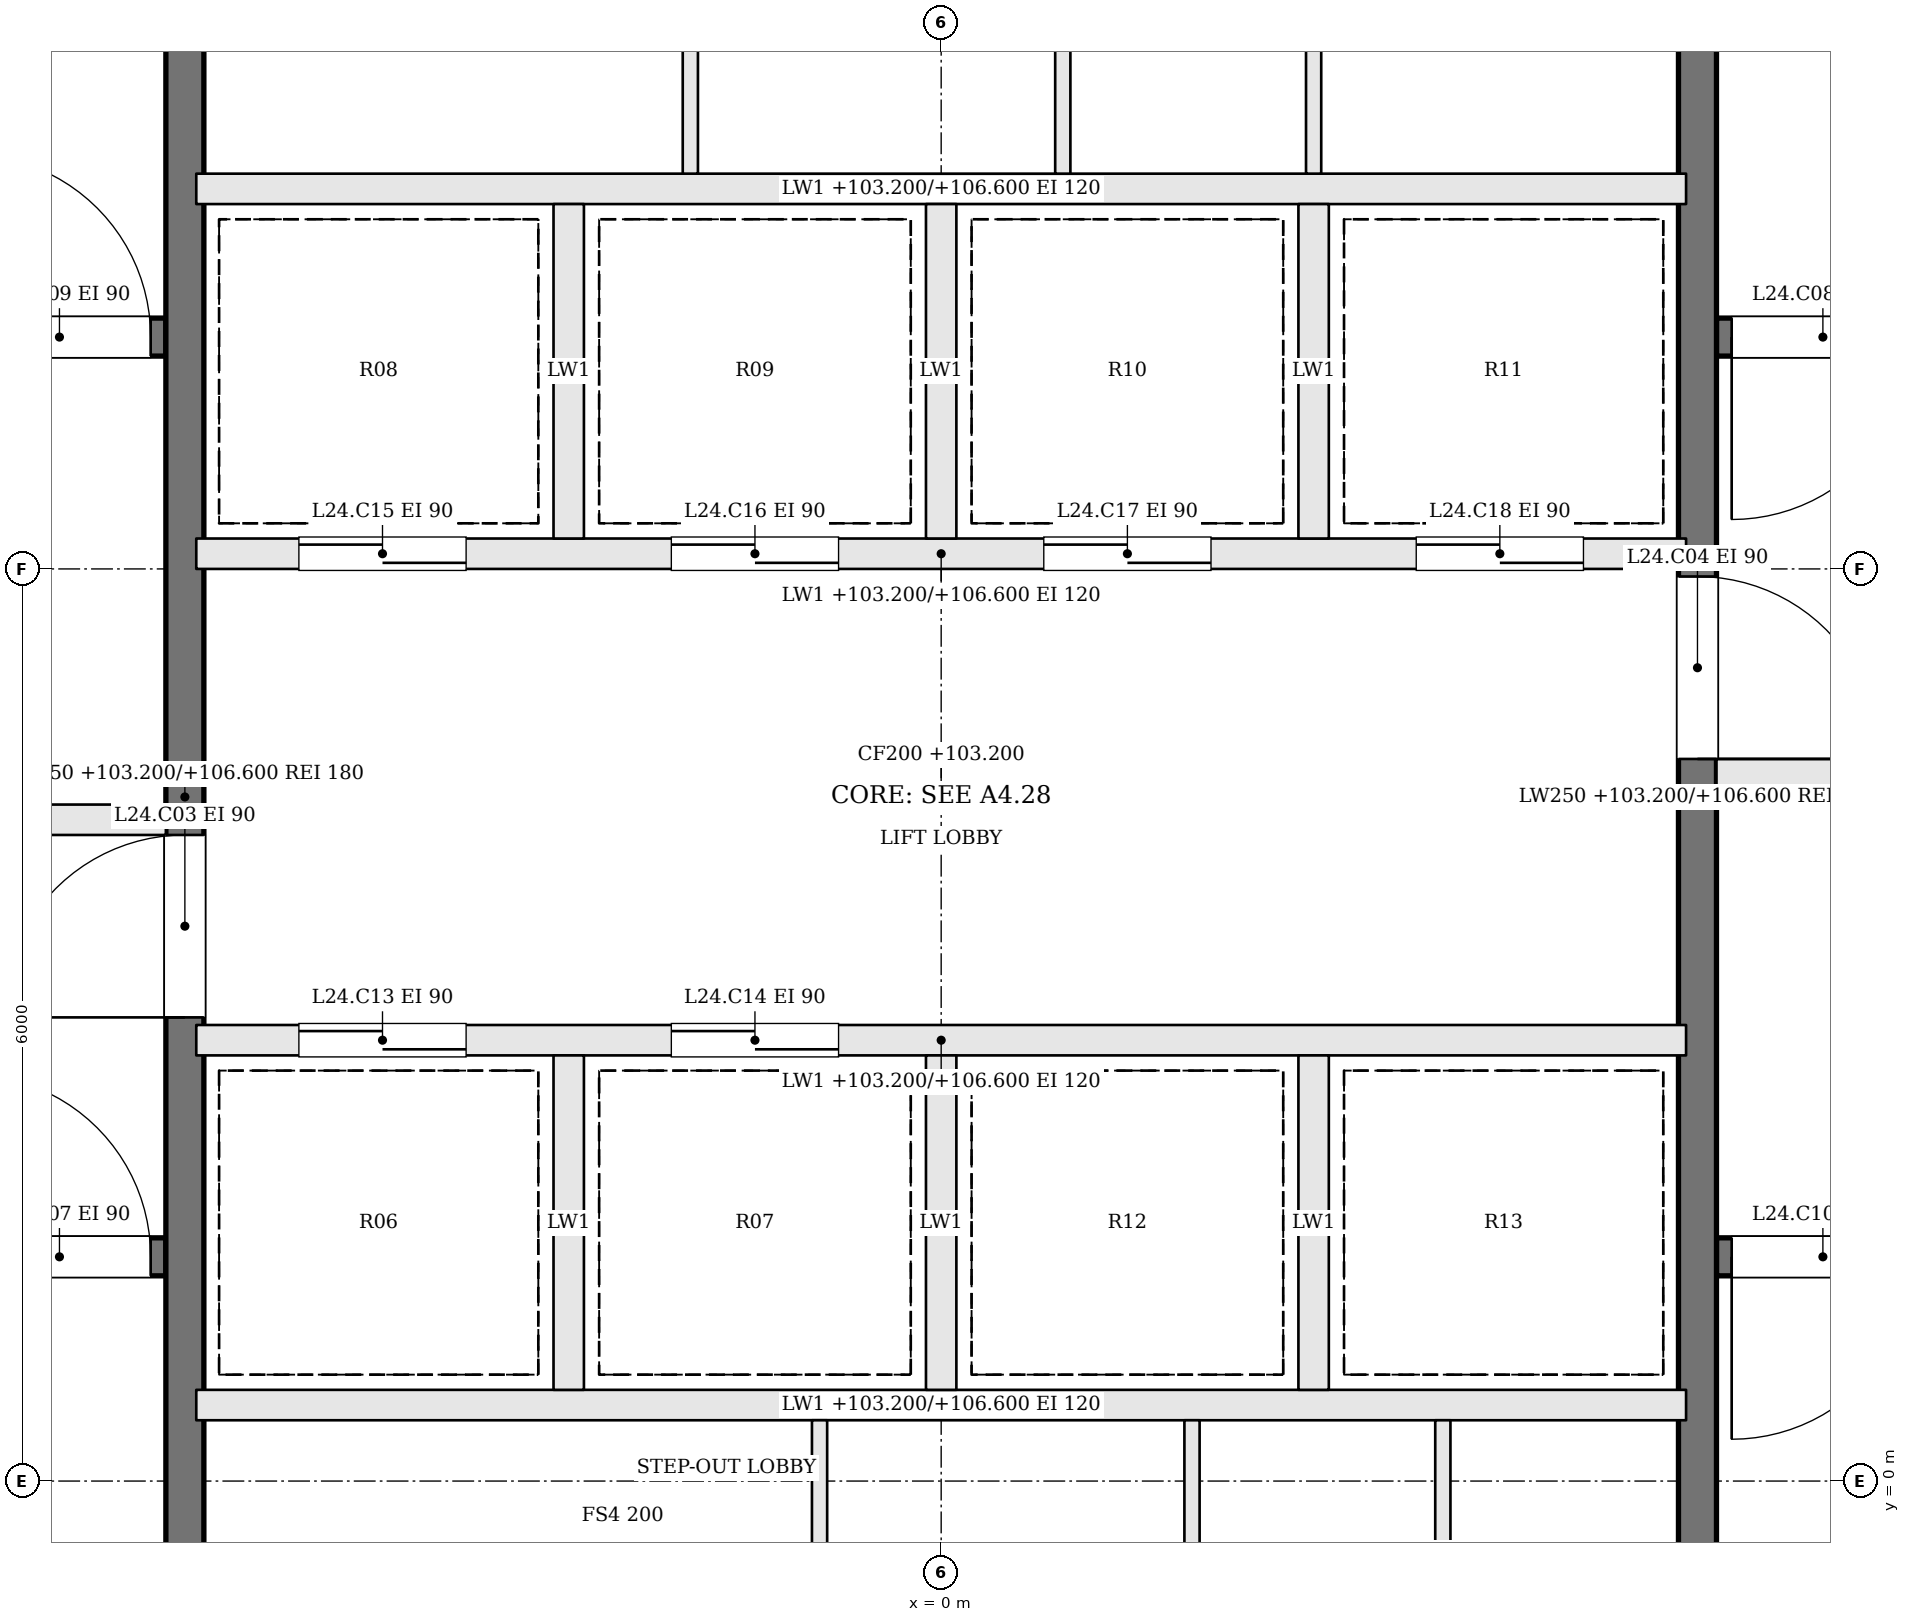
"""IFC4 building model, lengths in metres.
Left out: names, types, materials, properties, quantities, classifications, styles, units other than length and angle.
Written with IfcOpenShell. Run it as: python <this file> out.ifc"""

import sys

from ifc_helpers import new_model, si_unit, direction, frame, frame_2d, origin, place, context, subcontext, project, spatial, rectangle, extrude, element, fill, save


model = new_model("IFC4")
c1 = context("Model", 3, precision=1e-05, world=origin(), true_north=direction((0.0, 1.0)))
c2 = subcontext(c1, "Body", "Model", "MODEL_VIEW")
j1 = project(units=[si_unit("LENGTHUNIT", "METRE"), si_unit("PLANEANGLEUNIT", "RADIAN")], contexts=[c1])
p1 = place(None, origin())
s1 = spatial("IfcSite", under=j1, at=p1, CompositionType="ELEMENT")
p2 = place(p1, origin())
s2 = spatial("IfcBuilding", under=s1, at=p2, CompositionType="ELEMENT")
p3 = place(p2, frame((0.0, 0.0, 103.2)))
s3 = spatial("IfcBuildingStorey", under=s2, at=p3, CompositionType="ELEMENT", Elevation=103.2)
p4 = place(p3, frame((-11.9, 1.475, 0.0), z_axis=(0.0, 0.0, 1.0), x_axis=(1.0, 0.0, 0.0)))
e1 = element("IfcWall", 1, at=p4, inside=s3, PredefinedType="SOLIDWALL", context=c2, shape_type="SweptSolid", body=[
    extrude(rectangle(XDim=6.8, YDim=0.25, at=frame_2d((3.4, 0.0))), origin(), (0.0, 0.0, 1.0), 3.4),
])
p5 = place(p4, frame((5.5, 0.0, 0.0)))
e2 = element("IfcOpeningElement", 2, at=p5, cuts=e1, PredefinedType="OPENING", context=c2, shape_type="SweptSolid", body=[
    extrude(rectangle(XDim=1.2, YDim=2.1, at=frame_2d((0.6, 1.05))), frame((0.0, 0.135, 0.0), z_axis=(0.0, -1.0, 0.0), x_axis=(1.0, 0.0, 0.0)), (0.0, 0.0, 1.0), 0.27),
])
p6 = place(p3, frame((11.9, 7.525, 0.0), z_axis=(0.0, 0.0, 1.0), x_axis=(-1.0, 0.0, 0.0)))
e3 = element("IfcWall", 3, at=p6, inside=s3, PredefinedType="SOLIDWALL", context=c2, shape_type="SweptSolid", body=[
    extrude(rectangle(XDim=6.8, YDim=0.25, at=frame_2d((3.4, 0.0))), origin(), (0.0, 0.0, 1.0), 3.4),
])
p7 = place(p6, frame((5.5, 0.0, 0.0)))
e4 = element("IfcOpeningElement", 4, at=p7, cuts=e3, PredefinedType="OPENING", context=c2, shape_type="SweptSolid", body=[
    extrude(rectangle(XDim=1.2, YDim=2.1, at=frame_2d((0.6, 1.05))), frame((0.0, 0.135, 0.0), z_axis=(0.0, -1.0, 0.0), x_axis=(1.0, 0.0, 0.0)), (0.0, 0.0, 1.0), 0.27),
])
p8 = place(p3, frame((-11.9, 4.35, 0.0), z_axis=(0.0, 0.0, 1.0), x_axis=(1.0, 0.0, 0.0)))
e5 = element("IfcWall", 5, at=p8, inside=s3, PredefinedType="SOLIDWALL", context=c2, shape_type="SweptSolid", body=[
    extrude(rectangle(XDim=6.8, YDim=0.2, at=frame_2d((3.4, 0.0))), origin(), (0.0, 0.0, 1.0), 3.4),
])
p9 = place(p8, frame((4.1, 0.0, 0.0)))
e6 = element("IfcOpeningElement", 6, at=p9, cuts=e5, PredefinedType="OPENING", context=c2, shape_type="SweptSolid", body=[
    extrude(rectangle(XDim=1.2, YDim=2.1, at=frame_2d((0.6, 1.05))), frame((0.0, 0.11, 0.0), z_axis=(0.0, -1.0, 0.0), x_axis=(1.0, 0.0, 0.0)), (0.0, 0.0, 1.0), 0.22),
])
p10 = place(p8, frame((0.8, 0.0, 0.0)))
e7 = element("IfcOpeningElement", 7, at=p10, cuts=e5, PredefinedType="OPENING", context=c2, shape_type="SweptSolid", body=[
    extrude(rectangle(XDim=1.2, YDim=2.1, at=frame_2d((0.6, 1.05))), frame((0.0, 0.11, 0.0), z_axis=(0.0, -1.0, 0.0), x_axis=(1.0, 0.0, 0.0)), (0.0, 0.0, 1.0), 0.22),
])
p11 = place(p3, frame((11.9, 4.65, 0.0), z_axis=(0.0, 0.0, 1.0), x_axis=(-1.0, 0.0, 0.0)))
e8 = element("IfcWall", 8, at=p11, inside=s3, PredefinedType="SOLIDWALL", context=c2, shape_type="SweptSolid", body=[
    extrude(rectangle(XDim=6.8, YDim=0.2, at=frame_2d((3.4, 0.0))), origin(), (0.0, 0.0, 1.0), 3.4),
])
p12 = place(p11, frame((4.1, 0.0, 0.0)))
e9 = element("IfcOpeningElement", 9, at=p12, cuts=e8, PredefinedType="OPENING", context=c2, shape_type="SweptSolid", body=[
    extrude(rectangle(XDim=1.2, YDim=2.1, at=frame_2d((0.6, 1.05))), frame((0.0, 0.11, 0.0), z_axis=(0.0, -1.0, 0.0), x_axis=(1.0, 0.0, 0.0)), (0.0, 0.0, 1.0), 0.22),
])
p13 = place(p11, frame((0.8, 0.0, 0.0)))
e10 = element("IfcOpeningElement", 10, at=p13, cuts=e8, PredefinedType="OPENING", context=c2, shape_type="SweptSolid", body=[
    extrude(rectangle(XDim=1.2, YDim=2.1, at=frame_2d((0.6, 1.05))), frame((0.0, 0.11, 0.0), z_axis=(0.0, -1.0, 0.0), x_axis=(1.0, 0.0, 0.0)), (0.0, 0.0, 1.0), 0.22),
])
p14 = place(p3, frame((-11.9, 7.525, 0.0), z_axis=(0.0, 0.0, 1.0), x_axis=(1.0, 0.0, 0.0)))
e11 = element("IfcWall", 11, at=p14, inside=s3, PredefinedType="SOLIDWALL", context=c2, shape_type="SweptSolid", body=[
    extrude(rectangle(XDim=6.8, YDim=0.25, at=frame_2d((3.4, 0.0))), origin(), (0.0, 0.0, 1.0), 3.4),
])
p15 = place(p14, frame((5.5, 0.0, 0.0)))
e12 = element("IfcOpeningElement", 12, at=p15, cuts=e11, PredefinedType="OPENING", context=c2, shape_type="SweptSolid", body=[
    extrude(rectangle(XDim=1.2, YDim=2.1, at=frame_2d((0.6, 1.05))), frame((0.0, 0.135, 0.0), z_axis=(0.0, -1.0, 0.0), x_axis=(1.0, 0.0, 0.0)), (0.0, 0.0, 1.0), 0.27),
])
p16 = place(p3, frame((11.9, 1.475, 0.0), z_axis=(0.0, 0.0, 1.0), x_axis=(-1.0, 0.0, 0.0)))
e13 = element("IfcWall", 13, at=p16, inside=s3, PredefinedType="SOLIDWALL", context=c2, shape_type="SweptSolid", body=[
    extrude(rectangle(XDim=6.8, YDim=0.25, at=frame_2d((3.4, 0.0))), origin(), (0.0, 0.0, 1.0), 3.4),
])
p17 = place(p16, frame((5.5, 0.0, 0.0)))
e14 = element("IfcOpeningElement", 14, at=p17, cuts=e13, PredefinedType="OPENING", context=c2, shape_type="SweptSolid", body=[
    extrude(rectangle(XDim=1.2, YDim=2.1, at=frame_2d((0.6, 1.05))), frame((0.0, 0.135, 0.0), z_axis=(0.0, -1.0, 0.0), x_axis=(1.0, 0.0, 0.0)), (0.0, 0.0, 1.0), 0.27),
])
p18 = place(p3, frame((-4.975, -1.9, 0.0), z_axis=(0.0, 0.0, 1.0), x_axis=(0.0, 1.0, 0.0)))
e15 = element("IfcWall", 15, at=p18, inside=s3, PredefinedType="SOLIDWALL", context=c2, shape_type="SweptSolid", body=[
    extrude(rectangle(XDim=12.8, YDim=0.25, at=frame_2d((6.4, 0.0))), origin(), (0.0, 0.0, 1.0), 3.4),
])
p19 = place(p18, frame((4.95, 0.0, 0.0)))
e16 = element("IfcOpeningElement", 16, at=p19, cuts=e15, PredefinedType="OPENING", context=c2, shape_type="SweptSolid", body=[
    extrude(rectangle(XDim=1.2, YDim=2.1, at=frame_2d((0.6, 1.05))), frame((0.0, 0.135, 0.0), z_axis=(0.0, -1.0, 0.0), x_axis=(1.0, 0.0, 0.0)), (0.0, 0.0, 1.0), 0.27),
])
p20 = place(p3, frame((4.975, 10.9, 0.0), z_axis=(0.0, 0.0, 1.0), x_axis=(0.0, -1.0, 0.0)))
e17 = element("IfcWall", 17, at=p20, inside=s3, PredefinedType="SOLIDWALL", context=c2, shape_type="SweptSolid", body=[
    extrude(rectangle(XDim=12.8, YDim=0.25, at=frame_2d((6.4, 0.0))), origin(), (0.0, 0.0, 1.0), 3.4),
])
p21 = place(p20, frame((4.95, 0.0, 0.0)))
e18 = element("IfcOpeningElement", 18, at=p21, cuts=e17, PredefinedType="OPENING", context=c2, shape_type="SweptSolid", body=[
    extrude(rectangle(XDim=1.2, YDim=2.1, at=frame_2d((0.6, 1.05))), frame((0.0, 0.135, 0.0), z_axis=(0.0, -1.0, 0.0), x_axis=(1.0, 0.0, 0.0)), (0.0, 0.0, 1.0), 0.27),
])
p22 = place(p3, frame((-4.9, 0.5, 0.0), z_axis=(0.0, 0.0, 1.0), x_axis=(1.0, 0.0, 0.0)))
e19 = element("IfcWall", 19, at=p22, inside=s3, PredefinedType="SOLIDWALL", context=c2, shape_type="SweptSolid", body=[
    extrude(rectangle(XDim=9.8, YDim=0.2, at=frame_2d((4.9, 0.0))), origin(), (0.0, 0.0, 1.0), 3.4),
])
p23 = place(p3, frame((-4.9, 2.9, 0.0), z_axis=(0.0, 0.0, 1.0), x_axis=(1.0, 0.0, 0.0)))
e20 = element("IfcWall", 20, at=p23, inside=s3, PredefinedType="SOLIDWALL", context=c2, shape_type="SweptSolid", body=[
    extrude(rectangle(XDim=9.8, YDim=0.2, at=frame_2d((4.9, 0.0))), origin(), (0.0, 0.0, 1.0), 3.4),
])
p24 = place(p23, frame((0.675, 0.0, 0.0)))
e21 = element("IfcOpeningElement", 21, at=p24, cuts=e20, PredefinedType="OPENING", context=c2, shape_type="SweptSolid", body=[
    extrude(rectangle(XDim=1.1, YDim=2.1, at=frame_2d((0.55, 1.05))), frame((0.0, 0.11, 0.0), z_axis=(0.0, -1.0, 0.0), x_axis=(1.0, 0.0, 0.0)), (0.0, 0.0, 1.0), 0.22),
])
p25 = place(p23, frame((3.125, 0.0, 0.0)))
e22 = element("IfcOpeningElement", 22, at=p25, cuts=e20, PredefinedType="OPENING", context=c2, shape_type="SweptSolid", body=[
    extrude(rectangle(XDim=1.1, YDim=2.1, at=frame_2d((0.55, 1.05))), frame((0.0, 0.11, 0.0), z_axis=(0.0, -1.0, 0.0), x_axis=(1.0, 0.0, 0.0)), (0.0, 0.0, 1.0), 0.22),
])
p26 = place(p3, frame((-4.9, 6.1, 0.0), z_axis=(0.0, 0.0, 1.0), x_axis=(1.0, 0.0, 0.0)))
e23 = element("IfcWall", 23, at=p26, inside=s3, PredefinedType="SOLIDWALL", context=c2, shape_type="SweptSolid", body=[
    extrude(rectangle(XDim=9.8, YDim=0.2, at=frame_2d((4.9, 0.0))), origin(), (0.0, 0.0, 1.0), 3.4),
])
p27 = place(p26, frame((0.675, 0.0, 0.0)))
e24 = element("IfcOpeningElement", 24, at=p27, cuts=e23, PredefinedType="OPENING", context=c2, shape_type="SweptSolid", body=[
    extrude(rectangle(XDim=1.1, YDim=2.1, at=frame_2d((0.55, 1.05))), frame((0.0, 0.11, 0.0), z_axis=(0.0, -1.0, 0.0), x_axis=(1.0, 0.0, 0.0)), (0.0, 0.0, 1.0), 0.22),
])
p28 = place(p26, frame((3.125, 0.0, 0.0)))
e25 = element("IfcOpeningElement", 25, at=p28, cuts=e23, PredefinedType="OPENING", context=c2, shape_type="SweptSolid", body=[
    extrude(rectangle(XDim=1.1, YDim=2.1, at=frame_2d((0.55, 1.05))), frame((0.0, 0.11, 0.0), z_axis=(0.0, -1.0, 0.0), x_axis=(1.0, 0.0, 0.0)), (0.0, 0.0, 1.0), 0.22),
])
p29 = place(p26, frame((5.575, 0.0, 0.0)))
e26 = element("IfcOpeningElement", 26, at=p29, cuts=e23, PredefinedType="OPENING", context=c2, shape_type="SweptSolid", body=[
    extrude(rectangle(XDim=1.1, YDim=2.1, at=frame_2d((0.55, 1.05))), frame((0.0, 0.11, 0.0), z_axis=(0.0, -1.0, 0.0), x_axis=(1.0, 0.0, 0.0)), (0.0, 0.0, 1.0), 0.22),
])
p30 = place(p26, frame((8.025, 0.0, 0.0)))
e27 = element("IfcOpeningElement", 27, at=p30, cuts=e23, PredefinedType="OPENING", context=c2, shape_type="SweptSolid", body=[
    extrude(rectangle(XDim=1.1, YDim=2.1, at=frame_2d((0.55, 1.05))), frame((0.0, 0.11, 0.0), z_axis=(0.0, -1.0, 0.0), x_axis=(1.0, 0.0, 0.0)), (0.0, 0.0, 1.0), 0.22),
])
p31 = place(p3, frame((-4.9, 8.5, 0.0), z_axis=(0.0, 0.0, 1.0), x_axis=(1.0, 0.0, 0.0)))
e28 = element("IfcWall", 28, at=p31, inside=s3, PredefinedType="SOLIDWALL", context=c2, shape_type="SweptSolid", body=[
    extrude(rectangle(XDim=9.8, YDim=0.2, at=frame_2d((4.9, 0.0))), origin(), (0.0, 0.0, 1.0), 3.4),
])
for number, where, z_axis, x_axis in (
    (29, (-2.45, 0.6, 0.0), (0.0, 0.0, 1.0), (0.0, 1.0, 0.0)),
    (30, (0.0, 0.6, 0.0), (0.0, 0.0, 1.0), (0.0, 1.0, 0.0)),
    (31, (2.45, 0.6, 0.0), (0.0, 0.0, 1.0), (0.0, 1.0, 0.0)),
    (32, (-2.45, 6.2, 0.0), (0.0, 0.0, 1.0), (0.0, 1.0, 0.0)),
    (33, (0.0, 6.2, 0.0), (0.0, 0.0, 1.0), (0.0, 1.0, 0.0)),
    (34, (2.45, 6.2, 0.0), (0.0, 0.0, 1.0), (0.0, 1.0, 0.0)),
):
    element("IfcWall", number, at=place(p3, frame(where, z_axis=z_axis, x_axis=x_axis)), inside=s3, PredefinedType="SOLIDWALL", context=c2, shape_type="SweptSolid", body=[
        extrude(rectangle(XDim=2.2, YDim=0.2, at=frame_2d((1.1, 0.0))), origin(), (0.0, 0.0, 1.0), 3.4),
    ])
for number, where, z_axis, x_axis in (
    (35, (-0.8, -1.9, 0.0), (0.0, 0.0, 1.0), (0.0, 1.0, 0.0)),
    (36, (1.65, -1.9, 0.0), (0.0, 0.0, 1.0), (0.0, 1.0, 0.0)),
    (37, (3.3, -1.9, 0.0), (0.0, 0.0, 1.0), (0.0, 1.0, 0.0)),
    (38, (-1.65, 8.6, 0.0), (0.0, 0.0, 1.0), (0.0, 1.0, 0.0)),
    (39, (0.8, 8.6, 0.0), (0.0, 0.0, 1.0), (0.0, 1.0, 0.0)),
    (40, (2.45, 8.6, 0.0), (0.0, 0.0, 1.0), (0.0, 1.0, 0.0)),
):
    element("IfcWall", number, at=place(p3, frame(where, z_axis=z_axis, x_axis=x_axis)), inside=s3, PredefinedType="PARTITIONING", context=c2, shape_type="SweptSolid", body=[
        extrude(rectangle(XDim=2.3, YDim=0.1, at=frame_2d((1.15, 0.0))), origin(), (0.0, 0.0, 1.0), 3.4),
    ])
p32 = place(p19, origin())
e41 = element("IfcDoor", 41, at=p32, inside=s3, OperationType="SINGLE_SWING_LEFT", PredefinedType="DOOR", context=c2, shape_type="SweptSolid", body=[
    extrude(rectangle(XDim=1.2, YDim=2.1, at=frame_2d((0.6, 1.05))), frame((0.0, 0.025, 0.0), z_axis=(0.0, -1.0, 0.0), x_axis=(1.0, 0.0, 0.0)), (0.0, 0.0, 1.0), 0.05),
])
fill(e16, e41)
p33 = place(p21, origin())
e42 = element("IfcDoor", 42, at=p33, inside=s3, OperationType="SINGLE_SWING_RIGHT", PredefinedType="DOOR", context=c2, shape_type="SweptSolid", body=[
    extrude(rectangle(XDim=1.2, YDim=2.1, at=frame_2d((0.6, 1.05))), frame((0.0, 0.025, 0.0), z_axis=(0.0, -1.0, 0.0), x_axis=(1.0, 0.0, 0.0)), (0.0, 0.0, 1.0), 0.05),
])
fill(e18, e42)
p34 = place(p5, origin())
e43 = element("IfcDoor", 43, at=p34, inside=s3, OperationType="SINGLE_SWING_LEFT", PredefinedType="DOOR", context=c2, shape_type="SweptSolid", body=[
    extrude(rectangle(XDim=1.2, YDim=2.1, at=frame_2d((0.6, 1.05))), frame((0.0, 0.025, 0.0), z_axis=(0.0, -1.0, 0.0), x_axis=(1.0, 0.0, 0.0)), (0.0, 0.0, 1.0), 0.05),
])
fill(e2, e43)
p35 = place(p7, origin())
e44 = element("IfcDoor", 44, at=p35, inside=s3, OperationType="SINGLE_SWING_RIGHT", PredefinedType="DOOR", context=c2, shape_type="SweptSolid", body=[
    extrude(rectangle(XDim=1.2, YDim=2.1, at=frame_2d((0.6, 1.05))), frame((0.0, 0.025, 0.0), z_axis=(0.0, -1.0, 0.0), x_axis=(1.0, 0.0, 0.0)), (0.0, 0.0, 1.0), 0.05),
])
fill(e4, e44)
p36 = place(p15, origin())
e45 = element("IfcDoor", 45, at=p36, inside=s3, OperationType="SINGLE_SWING_LEFT", PredefinedType="DOOR", context=c2, shape_type="SweptSolid", body=[
    extrude(rectangle(XDim=1.2, YDim=2.1, at=frame_2d((0.6, 1.05))), frame((0.0, 0.025, 0.0), z_axis=(0.0, -1.0, 0.0), x_axis=(1.0, 0.0, 0.0)), (0.0, 0.0, 1.0), 0.05),
])
fill(e12, e45)
p37 = place(p17, origin())
e46 = element("IfcDoor", 46, at=p37, inside=s3, OperationType="SINGLE_SWING_RIGHT", PredefinedType="DOOR", context=c2, shape_type="SweptSolid", body=[
    extrude(rectangle(XDim=1.2, YDim=2.1, at=frame_2d((0.6, 1.05))), frame((0.0, 0.025, 0.0), z_axis=(0.0, -1.0, 0.0), x_axis=(1.0, 0.0, 0.0)), (0.0, 0.0, 1.0), 0.05),
])
fill(e14, e46)
p38 = place(p24, origin())
e47 = element("IfcDoor", 47, at=p38, inside=s3, OperationType="SLIDING_TO_RIGHT", PredefinedType="DOOR", context=c2, shape_type="SweptSolid", body=[
    extrude(rectangle(XDim=1.1, YDim=2.1, at=frame_2d((0.55, 1.05))), frame((0.0, 0.025, 0.0), z_axis=(0.0, -1.0, 0.0), x_axis=(1.0, 0.0, 0.0)), (0.0, 0.0, 1.0), 0.05),
])
fill(e21, e47)
p39 = place(p25, origin())
e48 = element("IfcDoor", 48, at=p39, inside=s3, OperationType="SLIDING_TO_LEFT", PredefinedType="DOOR", context=c2, shape_type="SweptSolid", body=[
    extrude(rectangle(XDim=1.1, YDim=2.1, at=frame_2d((0.55, 1.05))), frame((0.0, 0.025, 0.0), z_axis=(0.0, -1.0, 0.0), x_axis=(1.0, 0.0, 0.0)), (0.0, 0.0, 1.0), 0.05),
])
fill(e22, e48)
p40 = place(p27, origin())
e49 = element("IfcDoor", 49, at=p40, inside=s3, OperationType="SLIDING_TO_RIGHT", PredefinedType="DOOR", context=c2, shape_type="SweptSolid", body=[
    extrude(rectangle(XDim=1.1, YDim=2.1, at=frame_2d((0.55, 1.05))), frame((0.0, 0.025, 0.0), z_axis=(0.0, -1.0, 0.0), x_axis=(1.0, 0.0, 0.0)), (0.0, 0.0, 1.0), 0.05),
])
fill(e24, e49)
p41 = place(p28, origin())
e50 = element("IfcDoor", 50, at=p41, inside=s3, OperationType="SLIDING_TO_LEFT", PredefinedType="DOOR", context=c2, shape_type="SweptSolid", body=[
    extrude(rectangle(XDim=1.1, YDim=2.1, at=frame_2d((0.55, 1.05))), frame((0.0, 0.025, 0.0), z_axis=(0.0, -1.0, 0.0), x_axis=(1.0, 0.0, 0.0)), (0.0, 0.0, 1.0), 0.05),
])
fill(e25, e50)
p42 = place(p29, origin())
e51 = element("IfcDoor", 51, at=p42, inside=s3, OperationType="SLIDING_TO_RIGHT", PredefinedType="DOOR", context=c2, shape_type="SweptSolid", body=[
    extrude(rectangle(XDim=1.1, YDim=2.1, at=frame_2d((0.55, 1.05))), frame((0.0, 0.025, 0.0), z_axis=(0.0, -1.0, 0.0), x_axis=(1.0, 0.0, 0.0)), (0.0, 0.0, 1.0), 0.05),
])
fill(e26, e51)
p43 = place(p30, origin())
e52 = element("IfcDoor", 52, at=p43, inside=s3, OperationType="SLIDING_TO_LEFT", PredefinedType="DOOR", context=c2, shape_type="SweptSolid", body=[
    extrude(rectangle(XDim=1.1, YDim=2.1, at=frame_2d((0.55, 1.05))), frame((0.0, 0.025, 0.0), z_axis=(0.0, -1.0, 0.0), x_axis=(1.0, 0.0, 0.0)), (0.0, 0.0, 1.0), 0.05),
])
fill(e27, e52)
save(model, sys.argv[1])
